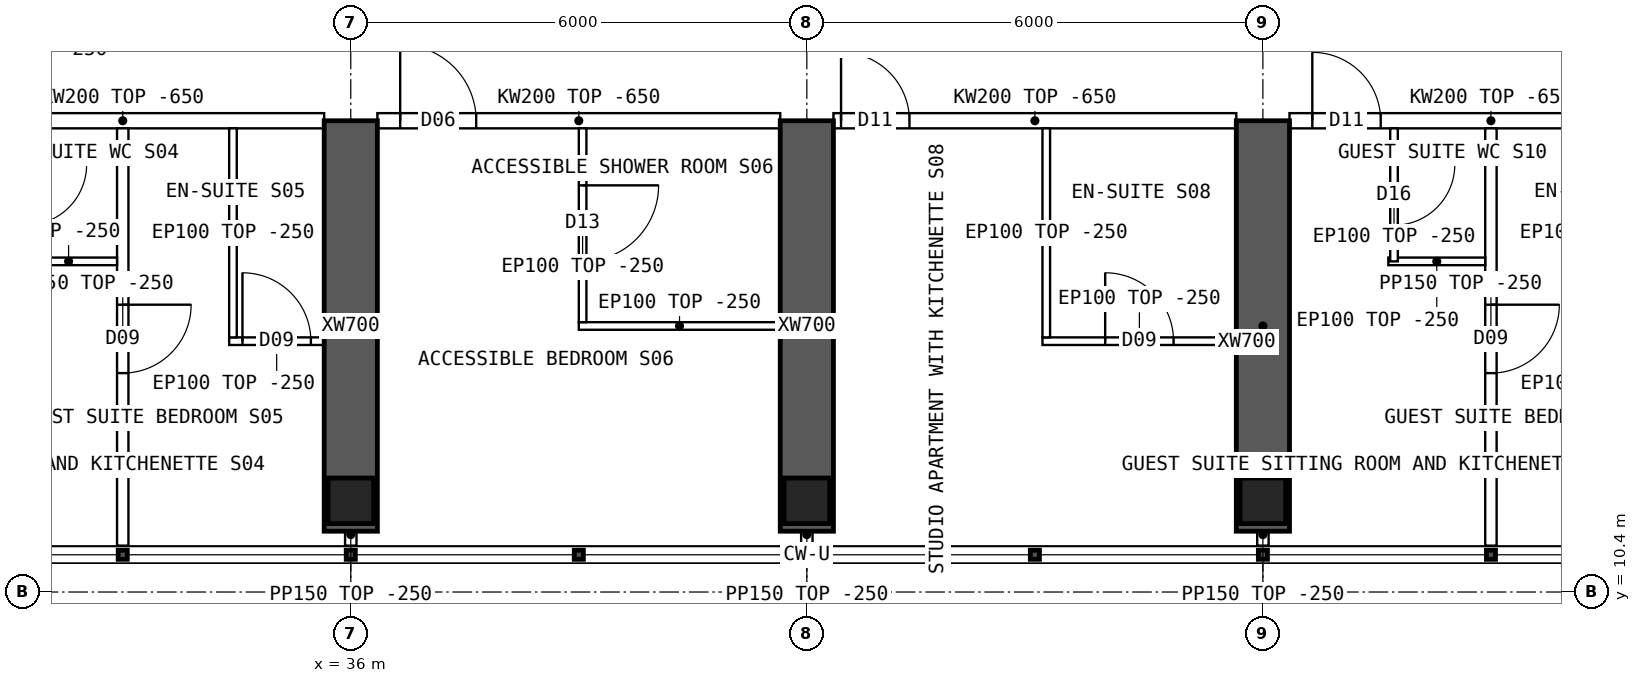
"""IFC4 building model, lengths in metres.
Left out: names, types, materials, properties, quantities, classifications, styles, units other than length and angle.
Written with IfcOpenShell. Run it as: python <this file> out.ifc"""

import sys

from ifc_helpers import new_model, si_unit, direction, frame, frame_2d, origin, origin_2d, place, context, subcontext, project, spatial, polyline, rectangle, hollow_rectangle, outline, extrude, element, fill, save


model = new_model("IFC4")
c1 = context("Model", 3, precision=1e-05, world=origin(), true_north=direction((0.0, 1.0)))
c2 = subcontext(c1, "Body", "Model", "MODEL_VIEW")
j1 = project(units=[si_unit("LENGTHUNIT", "METRE"), si_unit("PLANEANGLEUNIT", "RADIAN")], contexts=[c1])
p1 = place(None, origin())
s1 = spatial("IfcSite", under=j1, at=p1, CompositionType="ELEMENT")
p2 = place(p1, origin())
s2 = spatial("IfcBuilding", under=s1, at=p2, CompositionType="ELEMENT")
p3 = place(p2, frame((0.0, 0.0, 239.05)))
s3 = spatial("IfcBuildingStorey", under=s2, at=p3, CompositionType="ELEMENT", Elevation=239.05)
for number, where, z_axis, x_axis in (
    (1, (36.0, 11.6, 0.0), (0.0, 0.0, 1.0), (1.0, 0.0, 0.0)),
    (2, (42.0, 11.6, 0.0), (0.0, 0.0, 1.0), (1.0, 0.0, 0.0)),
    (3, (48.0, 11.6, 0.0), (0.0, 0.0, 1.0), (1.0, 0.0, 0.0)),
):
    element("IfcColumn", number, at=place(p3, frame(where, z_axis=z_axis, x_axis=x_axis)), inside=s3, PredefinedType="COLUMN", context=c2, shape_type="SweptSolid", body=[
        extrude(hollow_rectangle(XDim=0.6, YDim=0.6, WallThickness=0.06, at=origin_2d()), origin(), (0.0, 0.0, 1.0), 3.75),
    ])
for number, where, z_axis, x_axis in (
    (4, (36.0, 11.2, 0.0), (0.0, 0.0, 1.0), (0.0, 1.0, 0.0)),
    (5, (42.0, 11.2, 0.0), (0.0, 0.0, 1.0), (0.0, 1.0, 0.0)),
    (6, (48.0, 11.2, 0.0), (0.0, 0.0, 1.0), (0.0, 1.0, 0.0)),
):
    element("IfcWall", number, at=place(p3, frame(where, z_axis=z_axis, x_axis=x_axis)), inside=s3, PredefinedType="SHEAR", context=c2, shape_type="SweptSolid", body=[
        extrude(rectangle(XDim=5.4, YDim=0.7, at=frame_2d((2.7, 0.0))), origin(), (0.0, 0.0, 1.0), 3.75),
    ])
p4 = place(p3, frame((30.35, 16.6, 0.0), z_axis=(0.0, 0.0, 1.0), x_axis=(1.0, 0.0, 0.0)))
e7 = element("IfcWall", 7, at=p4, inside=s3, PredefinedType="SOLIDWALL", context=c2, shape_type="SweptSolid", body=[
    extrude(outline(polyline([(0.0, 0.0), (5.3, 0.0), (5.3, 3.1), (0.0, 3.1), (0.0, 0.0)])), frame((0.0, 0.1, 0.0), z_axis=(0.0, -1.0, 0.0), x_axis=(1.0, 0.0, 0.0)), (0.0, 0.0, 1.0), 0.2),
])
p5 = place(p4, frame((0.3, 0.0, 0.0)))
e8 = element("IfcOpeningElement", 8, at=p5, cuts=e7, PredefinedType="OPENING", context=c2, shape_type="SweptSolid", body=[
    extrude(rectangle(XDim=0.9, YDim=2.1, at=frame_2d((0.45, 1.05))), frame((0.0, 0.11, 0.0), z_axis=(0.0, -1.0, 0.0), x_axis=(1.0, 0.0, 0.0)), (0.0, 0.0, 1.0), 0.22),
])
p6 = place(p3, frame((36.35, 16.6, 0.0), z_axis=(0.0, 0.0, 1.0), x_axis=(1.0, 0.0, 0.0)))
e9 = element("IfcWall", 9, at=p6, inside=s3, PredefinedType="SOLIDWALL", context=c2, shape_type="SweptSolid", body=[
    extrude(outline(polyline([(0.0, 0.0), (5.3, 0.0), (5.3, 3.1), (0.0, 3.1), (0.0, 0.0)])), frame((0.0, 0.1, 0.0), z_axis=(0.0, -1.0, 0.0), x_axis=(1.0, 0.0, 0.0)), (0.0, 0.0, 1.0), 0.2),
])
p7 = place(p6, frame((0.3, 0.0, 0.0)))
e10 = element("IfcOpeningElement", 10, at=p7, cuts=e9, PredefinedType="OPENING", context=c2, shape_type="SweptSolid", body=[
    extrude(rectangle(XDim=1.0, YDim=2.1, at=frame_2d((0.5, 1.05))), frame((0.0, 0.11, 0.0), z_axis=(0.0, -1.0, 0.0), x_axis=(1.0, 0.0, 0.0)), (0.0, 0.0, 1.0), 0.22),
])
p8 = place(p3, frame((42.35, 16.6, 0.0), z_axis=(0.0, 0.0, 1.0), x_axis=(1.0, 0.0, 0.0)))
e11 = element("IfcWall", 11, at=p8, inside=s3, PredefinedType="SOLIDWALL", context=c2, shape_type="SweptSolid", body=[
    extrude(outline(polyline([(0.0, 0.0), (5.3, 0.0), (5.3, 3.1), (0.0, 3.1), (0.0, 0.0)])), frame((0.0, 0.1, 0.0), z_axis=(0.0, -1.0, 0.0), x_axis=(1.0, 0.0, 0.0)), (0.0, 0.0, 1.0), 0.2),
])
p9 = place(p8, frame((0.1, 0.0, 0.0)))
e12 = element("IfcOpeningElement", 12, at=p9, cuts=e11, PredefinedType="OPENING", context=c2, shape_type="SweptSolid", body=[
    extrude(rectangle(XDim=0.9, YDim=2.1, at=frame_2d((0.45, 1.05))), frame((0.0, 0.11, 0.0), z_axis=(0.0, -1.0, 0.0), x_axis=(1.0, 0.0, 0.0)), (0.0, 0.0, 1.0), 0.22),
])
p10 = place(p3, frame((48.35, 16.6, 0.0), z_axis=(0.0, 0.0, 1.0), x_axis=(1.0, 0.0, 0.0)))
e13 = element("IfcWall", 13, at=p10, inside=s3, PredefinedType="SOLIDWALL", context=c2, shape_type="SweptSolid", body=[
    extrude(outline(polyline([(0.0, 0.0), (5.3, 0.0), (5.3, 3.1), (0.0, 3.1), (0.0, 0.0)])), frame((0.0, 0.1, 0.0), z_axis=(0.0, -1.0, 0.0), x_axis=(1.0, 0.0, 0.0)), (0.0, 0.0, 1.0), 0.2),
])
p11 = place(p10, frame((0.3, 0.0, 0.0)))
e14 = element("IfcOpeningElement", 14, at=p11, cuts=e13, PredefinedType="OPENING", context=c2, shape_type="SweptSolid", body=[
    extrude(rectangle(XDim=0.9, YDim=2.1, at=frame_2d((0.45, 1.05))), frame((0.0, 0.11, 0.0), z_axis=(0.0, -1.0, 0.0), x_axis=(1.0, 0.0, 0.0)), (0.0, 0.0, 1.0), 0.22),
])
p12 = place(p3, frame((33.0, 11.01, 0.0), z_axis=(0.0, 0.0, 1.0), x_axis=(0.0, 1.0, 0.0)))
e15 = element("IfcWall", 15, at=p12, inside=s3, PredefinedType="PARTITIONING", context=c2, shape_type="SweptSolid", body=[
    extrude(outline(polyline([(0.0, 0.0), (5.49, 0.0), (5.49, 3.1), (5.442, 3.1), (5.44, 3.5), (0.792, 3.5), (0.79, 3.1), (0.392, 3.1), (0.39, 3.5), (0.0, 3.5), (0.0, 0.0)])), frame((0.0, 0.075, 0.0), z_axis=(0.0, -1.0, 0.0), x_axis=(1.0, 0.0, 0.0)), (0.0, 0.0, 1.0), 0.15),
])
p13 = place(p12, frame((2.27, 0.0, 0.0)))
e16 = element("IfcOpeningElement", 16, at=p13, cuts=e15, PredefinedType="OPENING", context=c2, shape_type="SweptSolid", body=[
    extrude(rectangle(XDim=0.9, YDim=2.1, at=frame_2d((0.45, 1.05))), frame((0.0, 0.085, 0.0), z_axis=(0.0, -1.0, 0.0), x_axis=(1.0, 0.0, 0.0)), (0.0, 0.0, 1.0), 0.17),
])
p14 = place(p3, frame((35.65, 13.7, 0.0), z_axis=(0.0, 0.0, 1.0), x_axis=(-1.0, 0.0, 0.0)))
e17 = element("IfcWall", 17, at=p14, inside=s3, PredefinedType="PARTITIONING", context=c2, shape_type="SweptSolid", body=[
    extrude(rectangle(XDim=1.25, YDim=0.1, at=frame_2d((0.625, 0.0))), origin(), (0.0, 0.0, 1.0), 3.5),
])
p15 = place(p14, frame((0.175, 0.0, 0.0)))
e18 = element("IfcOpeningElement", 18, at=p15, cuts=e17, PredefinedType="OPENING", context=c2, shape_type="SweptSolid", body=[
    extrude(rectangle(XDim=0.9, YDim=2.1, at=frame_2d((0.45, 1.05))), frame((0.0, 0.06, 0.0), z_axis=(0.0, -1.0, 0.0), x_axis=(1.0, 0.0, 0.0)), (0.0, 0.0, 1.0), 0.12),
])
p16 = place(p3, frame((34.45, 13.75, 0.0), z_axis=(0.0, 0.0, 1.0), x_axis=(0.0, 1.0, 0.0)))
e19 = element("IfcWall", 19, at=p16, inside=s3, PredefinedType="PARTITIONING", context=c2, shape_type="SweptSolid", body=[
    extrude(outline(polyline([(0.0, 0.0), (2.75, 0.0), (2.75, 3.1), (2.702, 3.1), (2.7, 3.5), (0.0, 3.5), (0.0, 0.0)])), frame((0.0, 0.05, 0.0), z_axis=(0.0, -1.0, 0.0), x_axis=(1.0, 0.0, 0.0)), (0.0, 0.0, 1.0), 0.1),
])
p17 = place(p3, frame((31.65, 14.75, 0.0), z_axis=(0.0, 0.0, 1.0), x_axis=(1.0, 0.0, 0.0)))
e20 = element("IfcWall", 20, at=p17, inside=s3, PredefinedType="PARTITIONING", context=c2, shape_type="SweptSolid", body=[
    extrude(rectangle(XDim=1.275, YDim=0.1, at=frame_2d((0.638, 0.0))), origin(), (0.0, 0.0, 1.0), 3.5),
])
p18 = place(p3, frame((39.0, 13.9, 0.0), z_axis=(0.0, 0.0, 1.0), x_axis=(1.0, 0.0, 0.0)))
e21 = element("IfcWall", 21, at=p18, inside=s3, PredefinedType="PARTITIONING", context=c2, shape_type="SweptSolid", body=[
    extrude(rectangle(XDim=2.65, YDim=0.1, at=frame_2d((1.325, 0.0))), origin(), (0.0, 0.0, 1.0), 3.5),
])
p19 = place(p3, frame((39.05, 13.95, 0.0), z_axis=(0.0, 0.0, 1.0), x_axis=(0.0, 1.0, 0.0)))
e22 = element("IfcWall", 22, at=p19, inside=s3, PredefinedType="PARTITIONING", context=c2, shape_type="SweptSolid", body=[
    extrude(outline(polyline([(0.0, 0.0), (2.55, 0.0), (2.55, 3.1), (2.502, 3.1), (2.5, 3.5), (0.0, 3.5), (0.0, 0.0)])), frame((0.0, 0.05, 0.0), z_axis=(0.0, -1.0, 0.0), x_axis=(1.0, 0.0, 0.0)), (0.0, 0.0, 1.0), 0.1),
])
p20 = place(p19, frame((0.8, 0.0, 0.0)))
e23 = element("IfcOpeningElement", 23, at=p20, cuts=e22, PredefinedType="OPENING", context=c2, shape_type="SweptSolid", body=[
    extrude(rectangle(XDim=1.0, YDim=2.1, at=frame_2d((0.5, 1.05))), frame((0.0, 0.06, 0.0), z_axis=(0.0, -1.0, 0.0), x_axis=(1.0, 0.0, 0.0)), (0.0, 0.0, 1.0), 0.12),
])
p21 = place(p3, frame((47.65, 13.7, 0.0), z_axis=(0.0, 0.0, 1.0), x_axis=(-1.0, 0.0, 0.0)))
e24 = element("IfcWall", 24, at=p21, inside=s3, PredefinedType="PARTITIONING", context=c2, shape_type="SweptSolid", body=[
    extrude(rectangle(XDim=2.55, YDim=0.1, at=frame_2d((1.275, 0.0))), origin(), (0.0, 0.0, 1.0), 3.5),
])
p22 = place(p21, frame((0.825, 0.0, 0.0)))
e25 = element("IfcOpeningElement", 25, at=p22, cuts=e24, PredefinedType="OPENING", context=c2, shape_type="SweptSolid", body=[
    extrude(rectangle(XDim=0.9, YDim=2.1, at=frame_2d((0.45, 1.05))), frame((0.0, 0.06, 0.0), z_axis=(0.0, -1.0, 0.0), x_axis=(1.0, 0.0, 0.0)), (0.0, 0.0, 1.0), 0.12),
])
p23 = place(p3, frame((45.15, 13.75, 0.0), z_axis=(0.0, 0.0, 1.0), x_axis=(0.0, 1.0, 0.0)))
e26 = element("IfcWall", 26, at=p23, inside=s3, PredefinedType="PARTITIONING", context=c2, shape_type="SweptSolid", body=[
    extrude(outline(polyline([(0.0, 0.0), (2.75, 0.0), (2.75, 3.1), (2.702, 3.1), (2.7, 3.5), (0.0, 3.5), (0.0, 0.0)])), frame((0.0, 0.05, 0.0), z_axis=(0.0, -1.0, 0.0), x_axis=(1.0, 0.0, 0.0)), (0.0, 0.0, 1.0), 0.1),
])
p24 = place(p3, frame((51.0, 11.01, 0.0), z_axis=(0.0, 0.0, 1.0), x_axis=(0.0, 1.0, 0.0)))
e27 = element("IfcWall", 27, at=p24, inside=s3, PredefinedType="PARTITIONING", context=c2, shape_type="SweptSolid", body=[
    extrude(outline(polyline([(0.0, 0.0), (5.49, 0.0), (5.49, 3.1), (5.442, 3.1), (5.44, 3.5), (0.792, 3.5), (0.79, 3.1), (0.392, 3.1), (0.39, 3.5), (0.0, 3.5), (0.0, 0.0)])), frame((0.0, 0.075, 0.0), z_axis=(0.0, -1.0, 0.0), x_axis=(1.0, 0.0, 0.0)), (0.0, 0.0, 1.0), 0.15),
])
p25 = place(p24, frame((2.27, 0.0, 0.0)))
e28 = element("IfcOpeningElement", 28, at=p25, cuts=e27, PredefinedType="OPENING", context=c2, shape_type="SweptSolid", body=[
    extrude(rectangle(XDim=0.9, YDim=2.1, at=frame_2d((0.45, 1.05))), frame((0.0, 0.085, 0.0), z_axis=(0.0, -1.0, 0.0), x_axis=(1.0, 0.0, 0.0)), (0.0, 0.0, 1.0), 0.17),
])
p26 = place(p3, frame((49.65, 14.75, 0.0), z_axis=(0.0, 0.0, 1.0), x_axis=(1.0, 0.0, 0.0)))
e29 = element("IfcWall", 29, at=p26, inside=s3, PredefinedType="PARTITIONING", context=c2, shape_type="SweptSolid", body=[
    extrude(rectangle(XDim=1.275, YDim=0.1, at=frame_2d((0.638, 0.0))), origin(), (0.0, 0.0, 1.0), 3.5),
])
p27 = place(p3, frame((49.725, 14.75, 0.0), z_axis=(0.0, 0.0, 1.0), x_axis=(0.0, 1.0, 0.0)))
e30 = element("IfcWall", 30, at=p27, inside=s3, PredefinedType="PARTITIONING", context=c2, shape_type="SweptSolid", body=[
    extrude(outline(polyline([(0.0, 0.0), (1.75, 0.0), (1.75, 3.1), (1.702, 3.1), (1.7, 3.5), (0.0, 3.5), (0.0, 0.0)])), frame((0.0, 0.05, 0.0), z_axis=(0.0, -1.0, 0.0), x_axis=(1.0, 0.0, 0.0)), (0.0, 0.0, 1.0), 0.1),
])
p28 = place(p27, frame((0.475, 0.0, 0.0)))
e31 = element("IfcOpeningElement", 31, at=p28, cuts=e30, PredefinedType="OPENING", context=c2, shape_type="SweptSolid", body=[
    extrude(rectangle(XDim=0.8, YDim=2.1, at=frame_2d((0.4, 1.05))), frame((0.0, 0.06, 0.0), z_axis=(0.0, -1.0, 0.0), x_axis=(1.0, 0.0, 0.0)), (0.0, 0.0, 1.0), 0.12),
])
for number, where, z_axis, x_axis in (
    (32, (36.0, 11.3, 0.0), (0.0, 0.0, 1.0), (0.0, -1.0, 0.0)),
    (33, (42.0, 11.3, 0.0), (0.0, 0.0, 1.0), (0.0, -1.0, 0.0)),
    (34, (48.0, 11.3, 0.0), (0.0, 0.0, 1.0), (0.0, -1.0, 0.0)),
):
    element("IfcWall", number, at=place(p3, frame(where, z_axis=z_axis, x_axis=x_axis)), inside=s3, PredefinedType="PARTITIONING", context=c2, shape_type="SweptSolid", body=[
        extrude(rectangle(XDim=0.29, YDim=0.15, at=frame_2d((0.145, 0.0))), origin(), (0.0, 0.0, 1.0), 3.5),
    ])
p29 = place(p15, origin())
e35 = element("IfcDoor", 35, at=p29, inside=s3, OperationType="SINGLE_SWING_RIGHT", PredefinedType="DOOR", context=c2, shape_type="SweptSolid", body=[
    extrude(rectangle(XDim=0.9, YDim=2.1, at=frame_2d((0.45, 1.05))), frame((0.0, 0.025, 0.0), z_axis=(0.0, -1.0, 0.0), x_axis=(1.0, 0.0, 0.0)), (0.0, 0.0, 1.0), 0.05),
])
fill(e18, e35)
p30 = place(p13, origin())
e36 = element("IfcDoor", 36, at=p30, inside=s3, OperationType="SINGLE_SWING_RIGHT", PredefinedType="DOOR", context=c2, shape_type="SweptSolid", body=[
    extrude(rectangle(XDim=0.9, YDim=2.1, at=frame_2d((0.45, 1.05))), frame((0.0, 0.025, 0.0), z_axis=(0.0, -1.0, 0.0), x_axis=(1.0, 0.0, 0.0)), (0.0, 0.0, 1.0), 0.05),
])
fill(e16, e36)
p31 = place(p20, origin())
e37 = element("IfcDoor", 37, at=p31, inside=s3, OperationType="SINGLE_SWING_RIGHT", PredefinedType="DOOR", context=c2, shape_type="SweptSolid", body=[
    extrude(rectangle(XDim=1.0, YDim=2.1, at=frame_2d((0.5, 1.05))), frame((0.0, 0.025, 0.0), z_axis=(0.0, -1.0, 0.0), x_axis=(1.0, 0.0, 0.0)), (0.0, 0.0, 1.0), 0.05),
])
fill(e23, e37)
p32 = place(p7, origin())
e38 = element("IfcDoor", 38, at=p32, inside=s3, OperationType="SINGLE_SWING_LEFT", PredefinedType="DOOR", context=c2, shape_type="SweptSolid", body=[
    extrude(rectangle(XDim=1.0, YDim=2.1, at=frame_2d((0.5, 1.05))), frame((0.0, 0.025, 0.0), z_axis=(0.0, -1.0, 0.0), x_axis=(1.0, 0.0, 0.0)), (0.0, 0.0, 1.0), 0.05),
])
fill(e10, e38)
p33 = place(p22, origin())
e39 = element("IfcDoor", 39, at=p33, inside=s3, OperationType="SINGLE_SWING_RIGHT", PredefinedType="DOOR", context=c2, shape_type="SweptSolid", body=[
    extrude(rectangle(XDim=0.9, YDim=2.1, at=frame_2d((0.45, 1.05))), frame((0.0, 0.025, 0.0), z_axis=(0.0, -1.0, 0.0), x_axis=(1.0, 0.0, 0.0)), (0.0, 0.0, 1.0), 0.05),
])
fill(e25, e39)
p34 = place(p9, origin())
e40 = element("IfcDoor", 40, at=p34, inside=s3, OperationType="SINGLE_SWING_LEFT", PredefinedType="DOOR", context=c2, shape_type="SweptSolid", body=[
    extrude(rectangle(XDim=0.9, YDim=2.1, at=frame_2d((0.45, 1.05))), frame((0.0, 0.025, 0.0), z_axis=(0.0, -1.0, 0.0), x_axis=(1.0, 0.0, 0.0)), (0.0, 0.0, 1.0), 0.05),
])
fill(e12, e40)
p35 = place(p11, origin())
e41 = element("IfcDoor", 41, at=p35, inside=s3, OperationType="SINGLE_SWING_LEFT", PredefinedType="DOOR", context=c2, shape_type="SweptSolid", body=[
    extrude(rectangle(XDim=0.9, YDim=2.1, at=frame_2d((0.45, 1.05))), frame((0.0, 0.025, 0.0), z_axis=(0.0, -1.0, 0.0), x_axis=(1.0, 0.0, 0.0)), (0.0, 0.0, 1.0), 0.05),
])
fill(e14, e41)
p36 = place(p25, origin())
e42 = element("IfcDoor", 42, at=p36, inside=s3, OperationType="SINGLE_SWING_RIGHT", PredefinedType="DOOR", context=c2, shape_type="SweptSolid", body=[
    extrude(rectangle(XDim=0.9, YDim=2.1, at=frame_2d((0.45, 1.05))), frame((0.0, 0.025, 0.0), z_axis=(0.0, -1.0, 0.0), x_axis=(1.0, 0.0, 0.0)), (0.0, 0.0, 1.0), 0.05),
])
fill(e28, e42)
p37 = place(p28, origin())
e43 = element("IfcDoor", 43, at=p37, inside=s3, OperationType="SINGLE_SWING_RIGHT", PredefinedType="DOOR", context=c2, shape_type="SweptSolid", body=[
    extrude(rectangle(XDim=0.8, YDim=2.1, at=frame_2d((0.4, 1.05))), frame((0.0, 0.025, 0.0), z_axis=(0.0, -1.0, 0.0), x_axis=(1.0, 0.0, 0.0)), (0.0, 0.0, 1.0), 0.05),
])
fill(e31, e43)
save(model, sys.argv[1])
